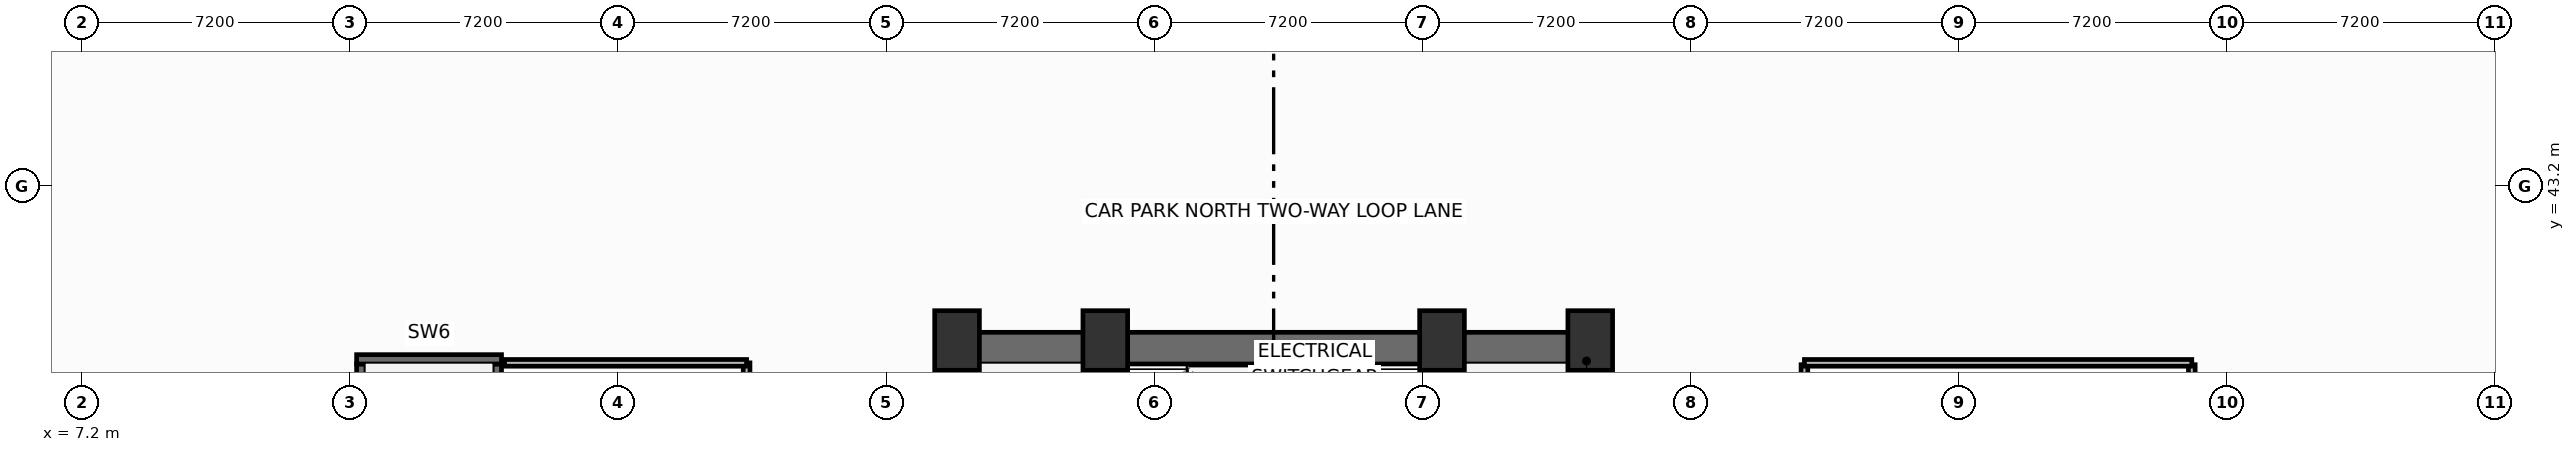
"""IFC4 building model, lengths in metres.
Left out: names, types, materials, properties, quantities, classifications, styles, units other than length and angle.
Written with IfcOpenShell. Run it as: python <this file> out.ifc"""

import sys

from ifc_helpers import new_model, si_unit, direction, frame, frame_2d, origin, origin_2d, place, context, subcontext, project, spatial, rectangle, extrude, element, save


model = new_model("IFC4")
c1 = context("Model", 3, precision=1e-05, world=origin(), true_north=direction((0.0, 1.0)))
c2 = subcontext(c1, "Body", "Model", "MODEL_VIEW")
j1 = project(units=[si_unit("LENGTHUNIT", "METRE"), si_unit("PLANEANGLEUNIT", "RADIAN")], contexts=[c1])
p1 = place(None, origin())
s1 = spatial("IfcSite", under=j1, at=p1, CompositionType="ELEMENT")
p2 = place(p1, origin())
s2 = spatial("IfcBuilding", under=s1, at=p2, CompositionType="ELEMENT")
p3 = place(p2, frame((0.0, 0.0, -4.5)))
s3 = spatial("IfcBuildingStorey", under=s2, at=p3, CompositionType="ELEMENT", Elevation=-4.5)
for number, where, z_axis, x_axis in (
    (1, (30.7, 39.05, 0.0), (0.0, 0.0, 1.0), (1.0, 0.0, 0.0)),
    (2, (34.68, 39.05, 0.0), (0.0, 0.0, 1.0), (1.0, 0.0, 0.0)),
    (3, (43.72, 39.05, 0.0), (0.0, 0.0, 1.0), (1.0, 0.0, 0.0)),
    (4, (47.7, 39.05, 0.0), (0.0, 0.0, 1.0), (1.0, 0.0, 0.0)),
):
    element("IfcColumn", number, at=place(p3, frame(where, z_axis=z_axis, x_axis=x_axis)), inside=s3, PredefinedType="COLUMN", context=c2, shape_type="SweptSolid", body=[
        extrude(rectangle(XDim=1.2, YDim=1.6, at=origin_2d()), origin(), (0.0, 0.0, 1.0), 4.5),
    ])
p4 = place(p3, frame((30.28, 38.845, 0.0), z_axis=(0.0, 0.0, 1.0), x_axis=(1.0, 0.0, 0.0)))
e5 = element("IfcWall", 5, at=p4, inside=s3, PredefinedType="SHEAR", context=c2, shape_type="SweptSolid", body=[
    extrude(rectangle(XDim=17.84, YDim=0.85, at=frame_2d((8.92, 0.0))), origin(), (0.0, 0.0, 1.0), 4.18),
])
for number, where, z_axis, x_axis in (
    (6, (30.705, 29.2, 0.0), (0.0, 0.0, 1.0), (0.0, 1.0, 0.0)),
    (7, (47.695, 29.2, 0.0), (0.0, 0.0, 1.0), (0.0, 1.0, 0.0)),
):
    element("IfcWall", number, at=place(p3, frame(where, z_axis=z_axis, x_axis=x_axis)), inside=s3, PredefinedType="SHEAR", context=c2, shape_type="SweptSolid", body=[
        extrude(rectangle(XDim=9.22, YDim=0.85, at=frame_2d((4.61, 0.0))), origin(), (0.0, 0.0, 1.0), 4.18),
    ])
p5 = place(p3, frame((34.64, 29.2, 0.0), z_axis=(0.0, 0.0, 1.0), x_axis=(0.0, 1.0, 0.0)))
e8 = element("IfcWall", 8, at=p5, inside=s3, PredefinedType="SHEAR", context=c2, shape_type="SweptSolid", body=[
    extrude(rectangle(XDim=9.22, YDim=0.25, at=frame_2d((4.61, 0.0))), origin(), (0.0, 0.0, 1.0), 4.18),
])
p6 = place(p5, frame((0.65, 0.0, 0.0)))
e9 = element("IfcOpeningElement", 9, at=p6, cuts=e8, PredefinedType="OPENING", context=c2, shape_type="SweptSolid", body=[
    extrude(rectangle(XDim=1.05, YDim=2.15, at=frame_2d((0.525, 1.075))), frame((0.0, 0.135, 0.0), z_axis=(0.0, -1.0, 0.0), x_axis=(1.0, 0.0, 0.0)), (0.0, 0.0, 1.0), 0.27),
])
p7 = place(p3, frame((43.76, 29.2, 0.0), z_axis=(0.0, 0.0, 1.0), x_axis=(0.0, 1.0, 0.0)))
e10 = element("IfcWall", 10, at=p7, inside=s3, PredefinedType="SHEAR", context=c2, shape_type="SweptSolid", body=[
    extrude(rectangle(XDim=9.22, YDim=0.25, at=frame_2d((4.61, 0.0))), origin(), (0.0, 0.0, 1.0), 4.18),
])
p8 = place(p7, frame((0.65, 0.0, 0.0)))
e11 = element("IfcOpeningElement", 11, at=p8, cuts=e10, PredefinedType="OPENING", context=c2, shape_type="SweptSolid", body=[
    extrude(rectangle(XDim=1.05, YDim=2.15, at=frame_2d((0.525, 1.075))), frame((0.0, 0.135, 0.0), z_axis=(0.0, -1.0, 0.0), x_axis=(1.0, 0.0, 0.0)), (0.0, 0.0, 1.0), 0.27),
])
p9 = place(p3, frame((14.705, 29.2, 0.0), z_axis=(0.0, 0.0, 1.0), x_axis=(0.0, 1.0, 0.0)))
e12 = element("IfcWall", 12, at=p9, inside=s3, PredefinedType="SHEAR", context=c2, shape_type="SweptSolid", body=[
    extrude(rectangle(XDim=9.22, YDim=0.25, at=frame_2d((4.61, 0.0))), origin(), (0.0, 0.0, 1.0), 4.18),
])
p10 = place(p3, frame((18.345, 29.2, 0.0), z_axis=(0.0, 0.0, 1.0), x_axis=(0.0, 1.0, 0.0)))
e13 = element("IfcWall", 13, at=p10, inside=s3, PredefinedType="SHEAR", context=c2, shape_type="SweptSolid", body=[
    extrude(rectangle(XDim=9.22, YDim=0.25, at=frame_2d((4.61, 0.0))), origin(), (0.0, 0.0, 1.0), 4.18),
])
p11 = place(p10, frame((0.65, 0.0, 0.0)))
e14 = element("IfcOpeningElement", 14, at=p11, cuts=e13, PredefinedType="OPENING", context=c2, shape_type="SweptSolid", body=[
    extrude(rectangle(XDim=1.05, YDim=2.15, at=frame_2d((0.525, 1.075))), frame((0.0, 0.135, 0.0), z_axis=(0.0, -1.0, 0.0), x_axis=(1.0, 0.0, 0.0)), (0.0, 0.0, 1.0), 0.27),
])
p12 = place(p3, frame((14.58, 38.545, 0.0), z_axis=(0.0, 0.0, 1.0), x_axis=(1.0, 0.0, 0.0)))
e15 = element("IfcWall", 15, at=p12, inside=s3, PredefinedType="SHEAR", context=c2, shape_type="SweptSolid", body=[
    extrude(rectangle(XDim=3.89, YDim=0.25, at=frame_2d((1.945, 0.0))), origin(), (0.0, 0.0, 1.0), 4.18),
])
p13 = place(p3, frame((25.05, 29.02, 0.0), z_axis=(0.0, 0.0, 1.0), x_axis=(0.0, 1.0, 0.0)))
e16 = element("IfcWall", 16, at=p13, inside=s3, PredefinedType="PARTITIONING", context=c2, shape_type="SweptSolid", body=[
    extrude(rectangle(XDim=9.43, YDim=0.18, at=frame_2d((4.715, 0.0))), origin(), (0.0, 0.0, 1.0), 4.18),
])
p14 = place(p3, frame((18.55, 38.45, 0.0), z_axis=(0.0, 0.0, 1.0), x_axis=(1.0, 0.0, 0.0)))
e17 = element("IfcWall", 17, at=p14, inside=s3, PredefinedType="PARTITIONING", context=c2, shape_type="SweptSolid", body=[
    extrude(rectangle(XDim=6.5, YDim=0.18, at=frame_2d((3.25, 0.0))), origin(), (0.0, 0.0, 1.0), 4.18),
])
p15 = place(p3, frame((63.85, 13.4, 0.0), z_axis=(0.0, 0.0, 1.0), x_axis=(0.0, 1.0, 0.0)))
e18 = element("IfcWall", 18, at=p15, inside=s3, PredefinedType="PARTITIONING", context=c2, shape_type="SweptSolid", body=[
    extrude(rectangle(XDim=25.0, YDim=0.18, at=frame_2d((12.5, 0.0))), origin(), (0.0, 0.0, 1.0), 4.18),
])
p16 = place(p15, frame((5.0, 0.0, 0.0)))
e19 = element("IfcOpeningElement", 19, at=p16, cuts=e18, PredefinedType="OPENING", context=c2, shape_type="SweptSolid", body=[
    extrude(rectangle(XDim=1.6, YDim=2.05, at=frame_2d((0.8, 1.025))), frame((0.0, 0.1, 0.0), z_axis=(0.0, -1.0, 0.0), x_axis=(1.0, 0.0, 0.0)), (0.0, 0.0, 1.0), 0.2),
])
p17 = place(p15, frame((17.5, 0.0, 0.0)))
e20 = element("IfcOpeningElement", 20, at=p17, cuts=e18, PredefinedType="OPENING", context=c2, shape_type="SweptSolid", body=[
    extrude(rectangle(XDim=1.6, YDim=2.05, at=frame_2d((0.8, 1.025))), frame((0.0, 0.1, 0.0), z_axis=(0.0, -1.0, 0.0), x_axis=(1.0, 0.0, 0.0)), (0.0, 0.0, 1.0), 0.2),
])
p18 = place(p3, frame((53.45, 13.4, 0.0), z_axis=(0.0, 0.0, 1.0), x_axis=(0.0, 1.0, 0.0)))
e21 = element("IfcWall", 21, at=p18, inside=s3, PredefinedType="PARTITIONING", context=c2, shape_type="SweptSolid", body=[
    extrude(rectangle(XDim=25.0, YDim=0.18, at=frame_2d((12.5, 0.0))), origin(), (0.0, 0.0, 1.0), 4.18),
])
p19 = place(p3, frame((53.45, 38.45, 0.0), z_axis=(0.0, 0.0, 1.0), x_axis=(1.0, 0.0, 0.0)))
e22 = element("IfcWall", 22, at=p19, inside=s3, PredefinedType="PARTITIONING", context=c2, shape_type="SweptSolid", body=[
    extrude(rectangle(XDim=10.4, YDim=0.18, at=frame_2d((5.2, 0.0))), origin(), (0.0, 0.0, 1.0), 4.18),
])
for number, where, z_axis, x_axis in (
    (23, (37.0, 34.44, 0.0), (0.0, 0.0, 1.0), (0.0, 1.0, 0.0)),
    (24, (41.4, 34.44, 0.0), (0.0, 0.0, 1.0), (0.0, 1.0, 0.0)),
):
    element("IfcWall", number, at=place(p3, frame(where, z_axis=z_axis, x_axis=x_axis)), inside=s3, PredefinedType="PARTITIONING", context=c2, shape_type="SweptSolid", body=[
        extrude(rectangle(XDim=3.9, YDim=0.2, at=frame_2d((1.95, 0.0))), origin(), (0.0, 0.0, 1.0), 4.18),
    ])
p20 = place(p3, frame((39.22, 35.75, 0.0), z_axis=(0.0, 0.0, 1.0), x_axis=(0.0, 1.0, 0.0)))
e25 = element("IfcWall", 25, at=p20, inside=s3, PredefinedType="PARTITIONING", context=c2, shape_type="SweptSolid", body=[
    extrude(rectangle(XDim=2.59, YDim=0.2, at=frame_2d((1.295, 0.0))), origin(), (0.0, 0.0, 1.0), 4.18),
])
save(model, sys.argv[1])
